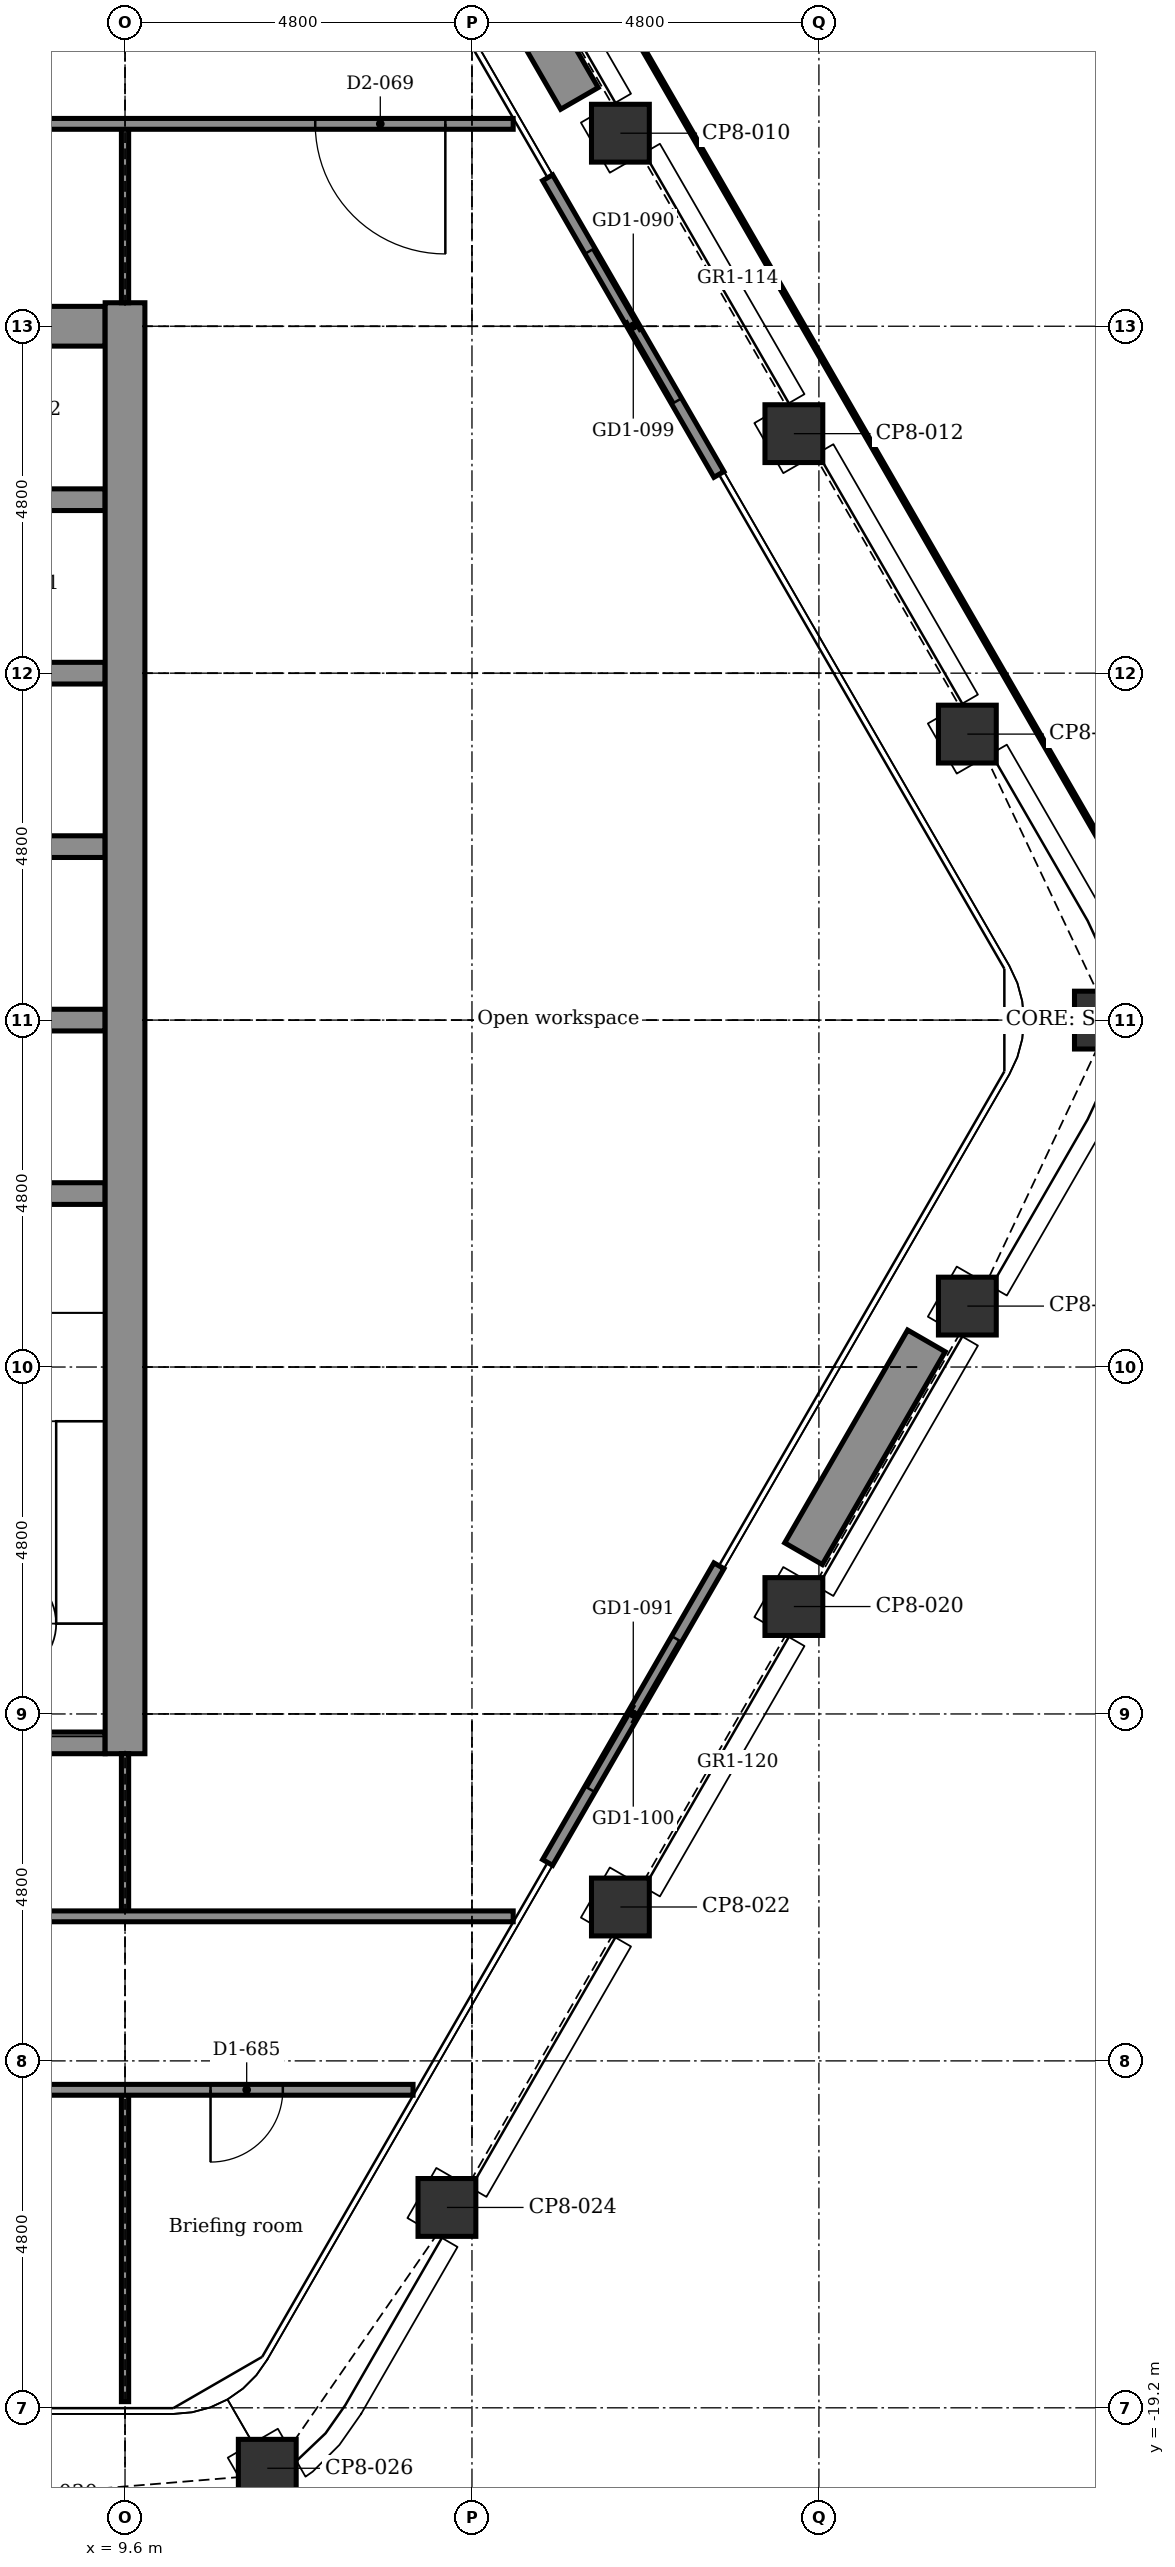
"""IFC4 building model, lengths in metres.
Left out: names, types, materials, properties, quantities, classifications, styles, units other than length and angle.
Written with IfcOpenShell. Run it as: python <this file> out.ifc"""

import sys

from ifc_helpers import new_model, si_unit, direction, frame, frame_2d, origin, origin_2d, place, context, subcontext, project, spatial, rectangle, extrude, element, fill, save


model = new_model("IFC4")
c1 = context("Model", 3, precision=1e-05, world=origin(), true_north=direction((0.0, 1.0)))
c2 = subcontext(c1, "Body", "Model", "MODEL_VIEW")
j1 = project(units=[si_unit("LENGTHUNIT", "METRE"), si_unit("PLANEANGLEUNIT", "RADIAN")], contexts=[c1])
p1 = place(None, origin())
s1 = spatial("IfcSite", under=j1, at=p1, CompositionType="ELEMENT")
p2 = place(p1, origin())
s2 = spatial("IfcBuilding", under=s1, at=p2, CompositionType="ELEMENT")
p3 = place(p2, frame((0.0, 0.0, 242.3)))
s3 = spatial("IfcBuildingStorey", under=s2, at=p3, CompositionType="ELEMENT", Elevation=242.3)
for number, where, z_axis, x_axis in (
    (1, (16.454, 12.271, -0.15), (0.0, 0.0, 1.0), (0.866, 0.5, 0.0)),
    (2, (18.854, 8.114, -0.15), (0.0, 0.0, 1.0), (0.866, 0.5, 0.0)),
    (3, (21.254, 3.957, -0.15), (0.0, 0.0, 1.0), (0.866, 0.5, 0.0)),
    (4, (23.136, 0.0, -0.15), (0.0, 0.0, 1.0), (1.0, 0.0, 0.0)),
    (5, (21.254, -3.957, -0.15), (0.0, 0.0, 1.0), (0.5, 0.866, 0.0)),
    (6, (18.854, -8.114, -0.15), (0.0, 0.0, 1.0), (0.5, 0.866, 0.0)),
    (7, (16.454, -12.271, -0.15), (0.0, 0.0, 1.0), (0.5, 0.866, 0.0)),
    (8, (14.054, -16.428, -0.15), (0.0, 0.0, 1.0), (0.5, 0.866, 0.0)),
    (9, (11.568, -20.036, -0.15), (0.0, 0.0, 1.0), (0.866, 0.5, 0.0)),
):
    element("IfcColumn", number, at=place(p3, frame(where, z_axis=z_axis, x_axis=x_axis)), inside=s3, PredefinedType="COLUMN", context=c2, shape_type="SweptSolid", body=[
        extrude(rectangle(XDim=0.8, YDim=0.8, at=origin_2d()), origin(), (0.0, 0.0, 1.0), 3.9),
    ])
p4 = place(p3, frame((4.95, -10.0, -0.15), z_axis=(0.0, 0.0, 1.0), x_axis=(1.0, 0.0, 0.0)))
e10 = element("IfcWall", 10, at=p4, inside=s3, PredefinedType="STANDARD", context=c2, shape_type="SweptSolid", body=[
    extrude(rectangle(XDim=4.375, YDim=0.3, at=frame_2d((2.188, 0.0))), origin(), (0.0, 0.0, 1.0), 3.9),
])
for number, where, z_axis, x_axis in (
    (11, (6.15, -2.4, -0.15), (0.0, 0.0, 1.0), (1.0, 0.0, 0.0)),
    (12, (6.15, 0.0, -0.15), (0.0, 0.0, 1.0), (1.0, 0.0, 0.0)),
    (13, (6.15, 2.4, -0.15), (0.0, 0.0, 1.0), (1.0, 0.0, 0.0)),
    (14, (6.15, 4.8, -0.15), (0.0, 0.0, 1.0), (1.0, 0.0, 0.0)),
):
    element("IfcWall", number, at=place(p3, frame(where, z_axis=z_axis, x_axis=x_axis)), inside=s3, PredefinedType="STANDARD", context=c2, shape_type="SweptSolid", body=[
        extrude(rectangle(XDim=3.175, YDim=0.3, at=frame_2d((1.587, 0.0))), origin(), (0.0, 0.0, 1.0), 3.9),
    ])
p5 = place(p3, frame((6.0, 7.2, -0.15), z_axis=(0.0, 0.0, 1.0), x_axis=(1.0, 0.0, 0.0)))
e15 = element("IfcWall", 15, at=p5, inside=s3, PredefinedType="STANDARD", context=c2, shape_type="SweptSolid", body=[
    extrude(rectangle(XDim=3.325, YDim=0.3, at=frame_2d((1.663, 0.0))), origin(), (0.0, 0.0, 1.0), 3.9),
])
p6 = place(p3, frame((-5.25, 9.6, -0.15), z_axis=(0.0, 0.0, 1.0), x_axis=(1.0, 0.0, 0.0)))
e16 = element("IfcWall", 16, at=p6, inside=s3, PredefinedType="SHEAR", context=c2, shape_type="SweptSolid", body=[
    extrude(rectangle(XDim=14.575, YDim=0.55, at=frame_2d((7.288, 0.0))), origin(), (0.0, 0.0, 1.0), 3.9),
])
p7 = place(p6, frame((0.6, 0.0, 0.15)))
e17 = element("IfcOpeningElement", 17, at=p7, cuts=e16, PredefinedType="OPENING", context=c2, shape_type="SweptSolid", body=[
    extrude(rectangle(XDim=0.9, YDim=2.1, at=frame_2d((0.45, 1.05))), frame((0.0, 0.285, 0.0), z_axis=(0.0, -1.0, 0.0), x_axis=(1.0, 0.0, 0.0)), (0.0, 0.0, 1.0), 0.57),
])
p8 = place(p3, frame((9.6, -10.15, -0.15), z_axis=(0.0, 0.0, 1.0), x_axis=(0.0, 1.0, 0.0)))
e18 = element("IfcWall", 18, at=p8, inside=s3, PredefinedType="SHEAR", context=c2, shape_type="SweptSolid", body=[
    extrude(rectangle(XDim=20.075, YDim=0.55, at=frame_2d((10.038, 0.0))), origin(), (0.0, 0.0, 1.0), 3.9),
])
p9 = place(p3, frame((15.447, 11.655, 0.0), z_axis=(0.0, 0.0, 1.0), x_axis=(0.499978080042, -0.866038058908, 0.0)))
e19 = element("IfcWall", 19, at=p9, inside=s3, PredefinedType="PARTITIONING", context=c2, shape_type="SweptSolid", body=[
    extrude(rectangle(XDim=4.74, YDim=0.16, at=frame_2d((2.37, 0.0))), origin(), (0.0, 0.0, 1.0), 3.75),
])
p10 = place(p9, frame((1.17, 0.0, 0.0)))
e20 = element("IfcOpeningElement", 20, at=p10, cuts=e19, PredefinedType="OPENING", context=c2, shape_type="SweptSolid", body=[
    extrude(rectangle(XDim=2.4, YDim=2.4, at=frame_2d((1.2, 1.2))), frame((0.0, 0.09, 0.0), z_axis=(0.0, -1.0, 0.0), x_axis=(1.0, 0.0, 0.0)), (0.0, 0.0, 1.0), 0.18),
])
p11 = place(p3, frame((17.817, -7.55, 0.0), z_axis=(0.0, 0.0, 1.0), x_axis=(-0.499978080042, -0.866038058908, 0.0)))
e21 = element("IfcWall", 21, at=p11, inside=s3, PredefinedType="PARTITIONING", context=c2, shape_type="SweptSolid", body=[
    extrude(rectangle(XDim=4.74, YDim=0.16, at=frame_2d((2.37, 0.0))), origin(), (0.0, 0.0, 1.0), 3.75),
])
p12 = place(p11, frame((1.17, 0.0, 0.0)))
e22 = element("IfcOpeningElement", 22, at=p12, cuts=e21, PredefinedType="OPENING", context=c2, shape_type="SweptSolid", body=[
    extrude(rectangle(XDim=2.4, YDim=2.4, at=frame_2d((1.2, 1.2))), frame((0.0, 0.09, 0.0), z_axis=(0.0, -1.0, 0.0), x_axis=(1.0, 0.0, 0.0)), (0.0, 0.0, 1.0), 0.18),
])
p13 = place(p3, frame((14.187, 15.697, 0.0), z_axis=(0.0, 0.0, 1.0), x_axis=(0.499977295307, -0.866038511948, 0.0)))
e23 = element("IfcWall", 23, at=p13, inside=s3, PredefinedType="USERDEFINED", context=c2, shape_type="SweptSolid", body=[
    extrude(rectangle(XDim=3.4, YDim=0.6, at=frame_2d((1.7, 0.0))), origin(), (0.0, 0.0, 1.0), 0.7),
])
p14 = place(p3, frame((20.687, -4.438, 0.0), z_axis=(0.0, 0.0, 1.0), x_axis=(-0.500008388397, -0.866020560687, 0.0)))
e24 = element("IfcWall", 24, at=p14, inside=s3, PredefinedType="USERDEFINED", context=c2, shape_type="SweptSolid", body=[
    extrude(rectangle(XDim=3.4, YDim=0.6, at=frame_2d((1.7, 0.0))), origin(), (0.0, 0.0, 1.0), 0.7),
])
p15 = place(p3, frame((9.6, -19.115, 0.0), z_axis=(0.0, 0.0, 1.0), x_axis=(0.0, 1.0, 0.0)))
e25 = element("IfcWall", 25, at=p15, inside=s3, PredefinedType="PARTITIONING", context=c2, shape_type="SweptSolid", body=[
    extrude(rectangle(XDim=4.314, YDim=0.1, at=frame_2d((2.157, 0.0))), origin(), (0.0, 0.0, 1.0), 3.293),
])
p16 = place(p3, frame((9.6, -12.4, 0.0), z_axis=(0.0, 0.0, 1.0), x_axis=(0.0, 1.0, 0.0)))
e26 = element("IfcWall", 26, at=p16, inside=s3, PredefinedType="PARTITIONING", context=c2, shape_type="SweptSolid", body=[
    extrude(rectangle(XDim=2.25, YDim=0.1, at=frame_2d((1.125, 0.0))), origin(), (0.0, 0.0, 1.0), 3.293),
])
p17 = place(p3, frame((9.6, 9.925, 0.0), z_axis=(0.0, 0.0, 1.0), x_axis=(0.0, 1.0, 0.0)))
e27 = element("IfcWall", 27, at=p17, inside=s3, PredefinedType="PARTITIONING", context=c2, shape_type="SweptSolid", body=[
    extrude(rectangle(XDim=2.475, YDim=0.1, at=frame_2d((1.237, 0.0))), origin(), (0.0, 0.0, 1.0), 3.217),
])
p18 = place(p3, frame((-13.585, -14.8, 0.0), z_axis=(0.0, 0.0, 1.0), x_axis=(1.0, 0.0, 0.0)))
e28 = element("IfcWall", 28, at=p18, inside=s3, PredefinedType="PARTITIONING", context=c2, shape_type="SweptSolid", body=[
    extrude(rectangle(XDim=27.169, YDim=0.15, at=frame_2d((13.585, 0.0))), origin(), (0.0, 0.0, 1.0), 3.75),
])
p19 = place(p18, frame((6.281, 0.0, 0.0)))
e29 = element("IfcOpeningElement", 29, at=p19, cuts=e28, PredefinedType="OPENING", context=c2, shape_type="SweptSolid", body=[
    extrude(rectangle(XDim=1.0, YDim=2.1, at=frame_2d((0.5, 1.05))), frame((0.0, 0.085, 0.0), z_axis=(0.0, -1.0, 0.0), x_axis=(1.0, 0.0, 0.0)), (0.0, 0.0, 1.0), 0.17),
])
p20 = place(p18, frame((11.16, 0.0, 0.0)))
e30 = element("IfcOpeningElement", 30, at=p20, cuts=e28, PredefinedType="OPENING", context=c2, shape_type="SweptSolid", body=[
    extrude(rectangle(XDim=1.0, YDim=2.1, at=frame_2d((0.5, 1.05))), frame((0.0, 0.085, 0.0), z_axis=(0.0, -1.0, 0.0), x_axis=(1.0, 0.0, 0.0)), (0.0, 0.0, 1.0), 0.17),
])
p21 = place(p18, frame((20.285, 0.0, 0.0)))
e31 = element("IfcOpeningElement", 31, at=p21, cuts=e28, PredefinedType="OPENING", context=c2, shape_type="SweptSolid", body=[
    extrude(rectangle(XDim=1.0, YDim=2.1, at=frame_2d((0.5, 1.05))), frame((0.0, 0.085, 0.0), z_axis=(0.0, -1.0, 0.0), x_axis=(1.0, 0.0, 0.0)), (0.0, 0.0, 1.0), 0.17),
])
p22 = place(p18, frame((24.368, 0.0, 0.0)))
e32 = element("IfcOpeningElement", 32, at=p22, cuts=e28, PredefinedType="OPENING", context=c2, shape_type="SweptSolid", body=[
    extrude(rectangle(XDim=1.0, YDim=2.1, at=frame_2d((0.5, 1.05))), frame((0.0, 0.085, 0.0), z_axis=(0.0, -1.0, 0.0), x_axis=(1.0, 0.0, 0.0)), (0.0, 0.0, 1.0), 0.17),
])
p23 = place(p3, frame((-3.0, -12.4, 0.0), z_axis=(0.0, 0.0, 1.0), x_axis=(1.0, 0.0, 0.0)))
e33 = element("IfcWall", 33, at=p23, inside=s3, PredefinedType="PARTITIONING", context=c2, shape_type="SweptSolid", body=[
    extrude(rectangle(XDim=17.97, YDim=0.15, at=frame_2d((8.985, 0.0))), origin(), (0.0, 0.0, 1.0), 3.75),
])
p24 = place(p23, frame((1.0, 0.0, 0.0)))
e34 = element("IfcOpeningElement", 34, at=p24, cuts=e33, PredefinedType="OPENING", context=c2, shape_type="SweptSolid", body=[
    extrude(rectangle(XDim=1.0, YDim=2.1, at=frame_2d((0.5, 1.05))), frame((0.0, 0.085, 0.0), z_axis=(0.0, -1.0, 0.0), x_axis=(1.0, 0.0, 0.0)), (0.0, 0.0, 1.0), 0.17),
])
p25 = place(p23, frame((4.95, 0.0, 0.0)))
e35 = element("IfcOpeningElement", 35, at=p25, cuts=e33, PredefinedType="OPENING", context=c2, shape_type="SweptSolid", body=[
    extrude(rectangle(XDim=0.9, YDim=2.1, at=frame_2d((0.45, 1.05))), frame((0.0, 0.085, 0.0), z_axis=(0.0, -1.0, 0.0), x_axis=(1.0, 0.0, 0.0)), (0.0, 0.0, 1.0), 0.17),
])
p26 = place(p23, frame((9.7, 0.0, 0.0)))
e36 = element("IfcOpeningElement", 36, at=p26, cuts=e33, PredefinedType="OPENING", context=c2, shape_type="SweptSolid", body=[
    extrude(rectangle(XDim=1.0, YDim=2.1, at=frame_2d((0.5, 1.05))), frame((0.0, 0.085, 0.0), z_axis=(0.0, -1.0, 0.0), x_axis=(1.0, 0.0, 0.0)), (0.0, 0.0, 1.0), 0.17),
])
p27 = place(p3, frame((-3.0, 12.4, 0.0), z_axis=(0.0, 0.0, 1.0), x_axis=(1.0, 0.0, 0.0)))
e37 = element("IfcWall", 37, at=p27, inside=s3, PredefinedType="PARTITIONING", context=c2, shape_type="SweptSolid", body=[
    extrude(rectangle(XDim=17.97, YDim=0.15, at=frame_2d((8.985, 0.0))), origin(), (0.0, 0.0, 1.0), 3.75),
])
p28 = place(p27, frame((1.165, 0.0, 0.0)))
e38 = element("IfcOpeningElement", 38, at=p28, cuts=e37, PredefinedType="OPENING", context=c2, shape_type="SweptSolid", body=[
    extrude(rectangle(XDim=1.0, YDim=2.1, at=frame_2d((0.5, 1.05))), frame((0.0, 0.085, 0.0), z_axis=(0.0, -1.0, 0.0), x_axis=(1.0, 0.0, 0.0)), (0.0, 0.0, 1.0), 0.17),
])
p29 = place(p27, frame((4.9, 0.0, 0.0)))
e39 = element("IfcOpeningElement", 39, at=p29, cuts=e37, PredefinedType="OPENING", context=c2, shape_type="SweptSolid", body=[
    extrude(rectangle(XDim=1.0, YDim=2.1, at=frame_2d((0.5, 1.05))), frame((0.0, 0.085, 0.0), z_axis=(0.0, -1.0, 0.0), x_axis=(1.0, 0.0, 0.0)), (0.0, 0.0, 1.0), 0.17),
])
p30 = place(p27, frame((9.7, 0.0, 0.0)))
e40 = element("IfcOpeningElement", 40, at=p30, cuts=e37, PredefinedType="OPENING", context=c2, shape_type="SweptSolid", body=[
    extrude(rectangle(XDim=1.0, YDim=2.1, at=frame_2d((0.5, 1.05))), frame((0.0, 0.085, 0.0), z_axis=(0.0, -1.0, 0.0), x_axis=(1.0, 0.0, 0.0)), (0.0, 0.0, 1.0), 0.17),
])
p31 = place(p27, frame((15.232, 0.0, 0.0)))
e41 = element("IfcOpeningElement", 41, at=p31, cuts=e37, PredefinedType="OPENING", context=c2, shape_type="SweptSolid", body=[
    extrude(rectangle(XDim=1.8, YDim=2.1, at=frame_2d((0.9, 1.05))), frame((0.0, 0.085, 0.0), z_axis=(0.0, -1.0, 0.0), x_axis=(1.0, 0.0, 0.0)), (0.0, 0.0, 1.0), 0.17),
])
p32 = place(p10, origin())
e42 = element("IfcDoor", 42, at=p32, inside=s3, OperationType="DOUBLE_DOOR_SLIDING", PredefinedType="DOOR", context=c2, shape_type="SweptSolid", body=[
    extrude(rectangle(XDim=2.4, YDim=2.4, at=frame_2d((1.2, 1.2))), frame((0.0, 0.025, 0.0), z_axis=(0.0, -1.0, 0.0), x_axis=(1.0, 0.0, 0.0)), (0.0, 0.0, 1.0), 0.05),
])
fill(e20, e42)
p33 = place(p12, origin())
e43 = element("IfcDoor", 43, at=p33, inside=s3, OperationType="DOUBLE_DOOR_SLIDING", PredefinedType="DOOR", context=c2, shape_type="SweptSolid", body=[
    extrude(rectangle(XDim=2.4, YDim=2.4, at=frame_2d((1.2, 1.2))), frame((0.0, 0.025, 0.0), z_axis=(0.0, -1.0, 0.0), x_axis=(1.0, 0.0, 0.0)), (0.0, 0.0, 1.0), 0.05),
])
fill(e22, e43)
p34 = place(p22, frame((1.0, 0.0, 0.0), z_axis=(0.0, 0.0, 1.0), x_axis=(-1.0, 0.0, 0.0)))
e44 = element("IfcDoor", 44, at=p34, inside=s3, OperationType="SINGLE_SWING_LEFT", PredefinedType="DOOR", context=c2, shape_type="SweptSolid", body=[
    extrude(rectangle(XDim=1.0, YDim=2.1, at=frame_2d((0.5, 1.05))), frame((0.0, 0.025, 0.0), z_axis=(0.0, -1.0, 0.0), x_axis=(1.0, 0.0, 0.0)), (0.0, 0.0, 1.0), 0.05),
])
fill(e32, e44)
p35 = place(p31, frame((1.8, 0.0, 0.0), z_axis=(0.0, 0.0, 1.0), x_axis=(-1.0, 0.0, 0.0)))
e45 = element("IfcDoor", 45, at=p35, inside=s3, OperationType="SINGLE_SWING_RIGHT", PredefinedType="DOOR", context=c2, shape_type="SweptSolid", body=[
    extrude(rectangle(XDim=1.8, YDim=2.1, at=frame_2d((0.9, 1.05))), frame((0.0, 0.025, 0.0), z_axis=(0.0, -1.0, 0.0), x_axis=(1.0, 0.0, 0.0)), (0.0, 0.0, 1.0), 0.05),
])
fill(e41, e45)
save(model, sys.argv[1])
